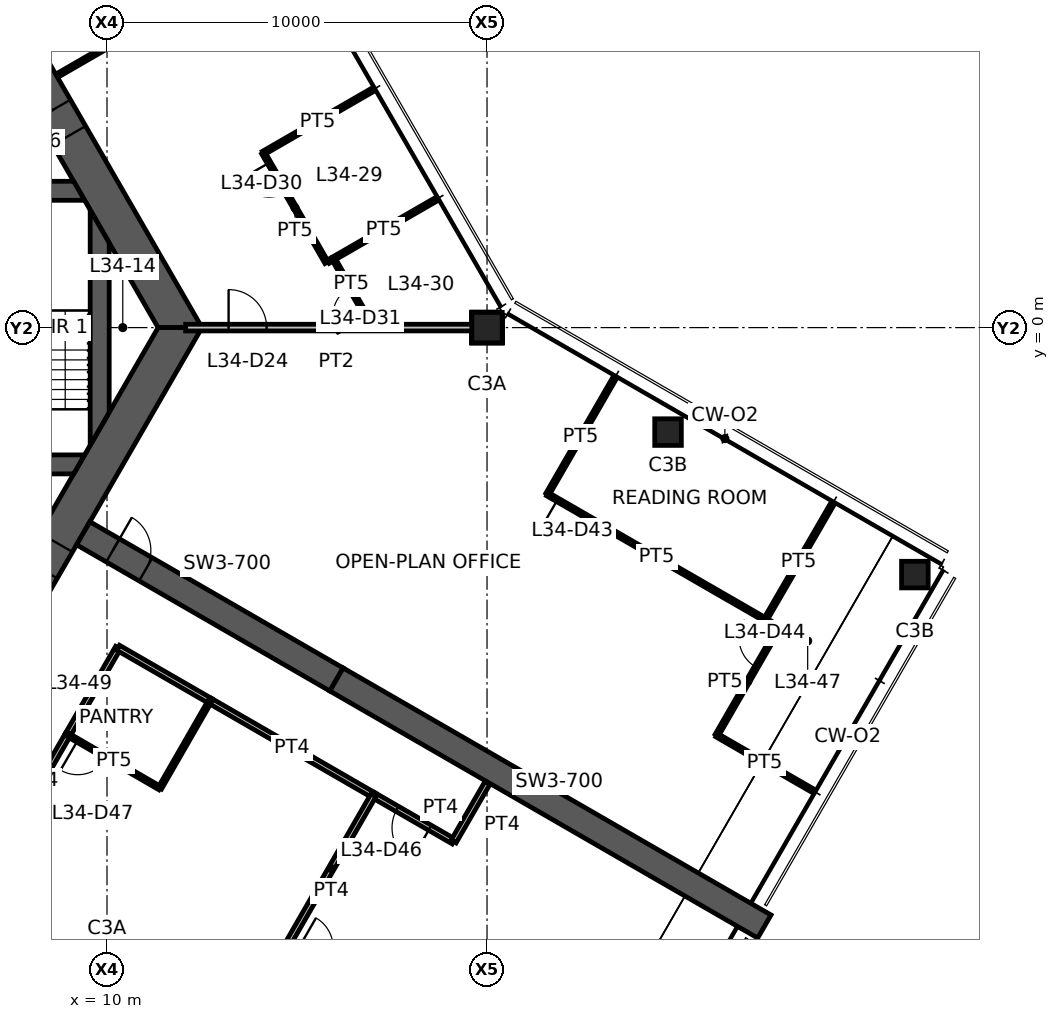
"""IFC4 building model, lengths in metres.
Left out: names, types, materials, properties, quantities, classifications, styles, units other than length and angle.
Written with IfcOpenShell. Run it as: python <this file> out.ifc"""

import sys

from ifc_helpers import new_model, si_unit, direction, frame, frame_2d, origin, origin_2d, place, context, subcontext, project, spatial, polyline, rectangle, hollow_rectangle, outline, extrude, element, fill, save


model = new_model("IFC4")
c1 = context("Model", 3, precision=1e-05, world=origin(), true_north=direction((0.0, 1.0)))
c2 = subcontext(c1, "Body", "Model", "MODEL_VIEW")
j1 = project(units=[si_unit("LENGTHUNIT", "METRE"), si_unit("PLANEANGLEUNIT", "RADIAN")], contexts=[c1])
p1 = place(None, origin())
s1 = spatial("IfcSite", under=j1, at=p1, CompositionType="ELEMENT")
p2 = place(p1, origin())
s2 = spatial("IfcBuilding", under=s1, at=p2, CompositionType="ELEMENT")
p3 = place(p2, frame((0.0, 0.0, 137.0)))
s3 = spatial("IfcBuildingStorey", under=s2, at=p3, CompositionType="ELEMENT", Elevation=137.0)
p4 = place(p3, frame((20.0, 0.0, 0.0), z_axis=(0.0, 0.0, 1.0), x_axis=(1.0, 0.0, 0.0)))
e1 = element("IfcColumn", 1, at=p4, inside=s3, PredefinedType="COLUMN", context=c2, shape_type="SweptSolid", body=[
    extrude(hollow_rectangle(XDim=0.8, YDim=0.8, WallThickness=0.045, at=origin_2d()), origin(), (0.0, 0.0, 1.0), 3.9),
])
for number, where, z_axis, x_axis in (
    (2, (24.763, -2.75, 0.0), (0.0, 0.0, 1.0), (1.0, 0.0, 0.0)),
    (3, (31.258, -6.5, 0.0), (0.0, 0.0, 1.0), (1.0, 0.0, 0.0)),
):
    element("IfcColumn", number, at=place(p3, frame(where, z_axis=z_axis, x_axis=x_axis)), inside=s3, PredefinedType="COLUMN", context=c2, shape_type="SweptSolid", body=[
        extrude(hollow_rectangle(XDim=0.7, YDim=0.7, WallThickness=0.036, at=origin_2d()), origin(), (0.0, 0.0, 1.0), 3.9),
    ])
p5 = place(p3, frame((11.922, 0.0, 0.0), z_axis=(0.0, 0.0, 1.0), x_axis=(-0.500004296715, 0.866022923061, 0.0)))
e4 = element("IfcWall", 4, at=p5, inside=s3, PredefinedType="SHEAR", context=c2, shape_type="SweptSolid", body=[
    extrude(outline(polyline([(-0.289, -0.5), (5.835, -0.5), (6.635, -0.5), (12.211, -0.5), (11.634, 0.5), (6.635, 0.5), (5.835, 0.5), (0.289, 0.5), (-0.289, -0.5)])), origin(), (0.0, 0.0, 1.0), 3.9),
])
p6 = place(p5, frame((5.835, 0.0, 0.0)))
e5 = element("IfcOpeningElement", 5, at=p6, cuts=e4, PredefinedType="OPENING", context=c2, shape_type="SweptSolid", body=[
    extrude(rectangle(XDim=0.8, YDim=2.1, at=frame_2d((0.4, 1.05))), frame((0.0, 0.51, 0.0), z_axis=(0.0, -1.0, 0.0), x_axis=(1.0, 0.0, 0.0)), (0.0, 0.0, 1.0), 1.02),
])
p7 = place(p3, frame((5.961, -10.325, 0.0), z_axis=(0.0, 0.0, 1.0), x_axis=(0.500004296715, 0.866022923061, 0.0)))
e6 = element("IfcWall", 6, at=p7, inside=s3, PredefinedType="SHEAR", context=c2, shape_type="SweptSolid", body=[
    extrude(outline(polyline([(-0.289, -0.5), (4.594, -0.5), (5.394, -0.5), (12.211, -0.5), (11.634, 0.5), (5.394, 0.5), (4.594, 0.5), (0.289, 0.5), (-0.289, -0.5)])), origin(), (0.0, 0.0, 1.0), 3.9),
])
p8 = place(p7, frame((4.594, 0.0, 0.0)))
e7 = element("IfcOpeningElement", 7, at=p8, cuts=e6, PredefinedType="OPENING", context=c2, shape_type="SweptSolid", body=[
    extrude(rectangle(XDim=0.8, YDim=2.1, at=frame_2d((0.4, 1.05))), frame((0.0, 0.51, 0.0), z_axis=(0.0, -1.0, 0.0), x_axis=(1.0, 0.0, 0.0)), (0.0, 0.0, 1.0), 1.02),
])
p9 = place(p3, frame((9.375, -5.413, 0.0), z_axis=(0.0, 0.0, 1.0), x_axis=(0.866032377459, -0.499987921047, 0.0)))
e8 = element("IfcWall", 8, at=p9, inside=s3, PredefinedType="SHEAR", context=c2, shape_type="SweptSolid", body=[
    extrude(rectangle(XDim=7.696, YDim=0.7, at=frame_2d((3.848, 0.0))), origin(), (0.0, 0.0, 1.0), 3.9),
])
p10 = place(p9, frame((0.9, 0.0, 0.0)))
e9 = element("IfcOpeningElement", 9, at=p10, cuts=e8, PredefinedType="OPENING", context=c2, shape_type="SweptSolid", body=[
    extrude(rectangle(XDim=1.0, YDim=2.1, at=frame_2d((0.5, 1.05))), frame((0.0, 0.36, 0.0), z_axis=(0.0, -1.0, 0.0), x_axis=(1.0, 0.0, 0.0)), (0.0, 0.0, 1.0), 0.72),
])
p11 = place(p3, frame((16.039, -9.26, 0.0), z_axis=(0.0, 0.0, 1.0), x_axis=(0.866024837091, -0.50000098154, 0.0)))
e10 = element("IfcWall", 10, at=p11, inside=s3, PredefinedType="SHEAR", context=c2, shape_type="SweptSolid", body=[
    extrude(rectangle(XDim=13.0, YDim=0.7, at=frame_2d((6.5, 0.0))), origin(), (0.0, 0.0, 1.0), 3.9),
])
p12 = place(p3, frame((1.35, 3.6, 0.0), z_axis=(0.0, 0.0, 1.0), x_axis=(1.0, 0.0, 0.0)))
e11 = element("IfcWall", 11, at=p12, inside=s3, PredefinedType="SHEAR", context=c2, shape_type="SweptSolid", body=[
    extrude(outline(polyline([(0.0, -0.25), (3.5, -0.25), (4.8, -0.25), (8.061, -0.25), (7.772, 0.25), (4.8, 0.25), (3.5, 0.25), (0.0, 0.25), (0.0, -0.25)])), origin(), (0.0, 0.0, 1.0), 3.9),
])
p13 = place(p12, frame((3.5, 0.0, 0.0)))
e12 = element("IfcOpeningElement", 12, at=p13, cuts=e11, PredefinedType="OPENING", context=c2, shape_type="SweptSolid", body=[
    extrude(rectangle(XDim=1.3, YDim=2.1, at=frame_2d((0.65, 1.05))), frame((0.0, 0.26, 0.0), z_axis=(0.0, -1.0, 0.0), x_axis=(1.0, 0.0, 0.0)), (0.0, 0.0, 1.0), 0.52),
])
p14 = place(p3, frame((1.35, -3.6, 0.0), z_axis=(0.0, 0.0, 1.0), x_axis=(1.0, 0.0, 0.0)))
e13 = element("IfcWall", 13, at=p14, inside=s3, PredefinedType="SHEAR", context=c2, shape_type="SweptSolid", body=[
    extrude(outline(polyline([(0.0, -0.25), (1.15, -0.25), (2.25, -0.25), (7.772, -0.25), (8.061, 0.25), (2.25, 0.25), (1.15, 0.25), (0.0, 0.25), (0.0, -0.25)])), origin(), (0.0, 0.0, 1.0), 3.9),
])
p15 = place(p14, frame((1.15, 0.0, 0.0)))
e14 = element("IfcOpeningElement", 14, at=p15, cuts=e13, PredefinedType="OPENING", context=c2, shape_type="SweptSolid", body=[
    extrude(rectangle(XDim=1.1, YDim=2.1, at=frame_2d((0.55, 1.05))), frame((0.0, 0.26, 0.0), z_axis=(0.0, -1.0, 0.0), x_axis=(1.0, 0.0, 0.0)), (0.0, 0.0, 1.0), 0.52),
])
p16 = place(p3, frame((9.808, -2.662, 0.0), z_axis=(0.0, 0.0, 1.0), x_axis=(0.0, 1.0, 0.0)))
e15 = element("IfcWall", 15, at=p16, inside=s3, PredefinedType="SHEAR", context=c2, shape_type="SweptSolid", body=[
    extrude(outline(polyline([(0.433, -0.25), (4.892, -0.25), (5.758, 0.25), (-0.433, 0.25), (0.433, -0.25)])), origin(), (0.0, 0.0, 1.0), 3.9),
])
p17 = place(p3, frame((12.07, 0.0, 0.0), z_axis=(0.0, 0.0, 1.0), x_axis=(1.0, 0.0, 0.0)))
e16 = element("IfcWall", 16, at=p17, inside=s3, PredefinedType="PARTITIONING", context=c2, shape_type="SweptSolid", body=[
    extrude(rectangle(XDim=7.93, YDim=0.175, at=frame_2d((3.965, 0.0))), origin(), (0.0, 0.0, 1.0), 3.05),
])
p18 = place(p17, frame((1.13, 0.0, 0.0)))
e17 = element("IfcOpeningElement", 17, at=p18, cuts=e16, PredefinedType="OPENING", context=c2, shape_type="SweptSolid", body=[
    extrude(rectangle(XDim=1.0, YDim=2.1, at=frame_2d((0.5, 1.05))), frame((0.0, 0.098, 0.0), z_axis=(0.0, -1.0, 0.0), x_axis=(1.0, 0.0, 0.0)), (0.0, 0.0, 1.0), 0.195),
])
p19 = place(p3, frame((11.1, 8.025, 0.0), z_axis=(0.0, 0.0, 1.0), x_axis=(-0.866056901187, -0.49994544093, 0.0)))
e18 = element("IfcWall", 18, at=p19, inside=s3, PredefinedType="PARTITIONING", context=c2, shape_type="SweptSolid", body=[
    extrude(rectangle(XDim=2.78, YDim=0.1, at=frame_2d((1.39, 0.0))), origin(), (0.0, 0.0, 1.0), 2.95),
])
p20 = place(p3, frame((18.62, 3.351, 0.0), z_axis=(0.0, 0.0, 1.0), x_axis=(-0.866043267704, -0.499969057507, 0.0)))
e19 = element("IfcWall", 19, at=p20, inside=s3, PredefinedType="PARTITIONING", context=c2, shape_type="SweptSolid", body=[
    extrude(rectangle(XDim=3.085, YDim=0.1, at=frame_2d((1.542, 0.0))), origin(), (0.0, 0.0, 1.0), 2.95),
])
p21 = place(p3, frame((14.114, 4.595, 0.0), z_axis=(0.0, 0.0, 1.0), x_axis=(0.866020751647, 0.500008057651, 0.0)))
e20 = element("IfcWall", 20, at=p21, inside=s3, PredefinedType="PARTITIONING", context=c2, shape_type="SweptSolid", body=[
    extrude(rectangle(XDim=3.305, YDim=0.1, at=frame_2d((1.653, 0.0))), origin(), (0.0, 0.0, 1.0), 2.95),
])
p22 = place(p3, frame((15.779, 1.71, 0.0), z_axis=(0.0, 0.0, 1.0), x_axis=(-0.500001606164, 0.866024476463, 0.0)))
e21 = element("IfcWall", 21, at=p22, inside=s3, PredefinedType="PARTITIONING", context=c2, shape_type="SweptSolid", body=[
    extrude(rectangle(XDim=3.331, YDim=0.1, at=frame_2d((1.666, 0.0))), origin(), (0.0, 0.0, 1.0), 2.95),
])
p23 = place(p22, frame((2.131, 0.0, 0.0)))
e22 = element("IfcOpeningElement", 22, at=p23, cuts=e21, PredefinedType="OPENING", context=c2, shape_type="SweptSolid", body=[
    extrude(rectangle(XDim=0.9, YDim=2.1, at=frame_2d((0.45, 1.05))), frame((0.0, 0.06, 0.0), z_axis=(0.0, -1.0, 0.0), x_axis=(1.0, 0.0, 0.0)), (0.0, 0.0, 1.0), 0.12),
])
p24 = place(p3, frame((16.986, 0.02, 0.0), z_axis=(0.0, 0.0, 1.0), x_axis=(-0.498096123952, 0.867121820337, 0.0)))
e23 = element("IfcWall", 23, at=p24, inside=s3, PredefinedType="PARTITIONING", context=c2, shape_type="SweptSolid", body=[
    extrude(rectangle(XDim=2.067, YDim=0.1, at=frame_2d((1.034, 0.0))), origin(), (0.0, 0.0, 1.0), 2.95),
])
p25 = place(p24, frame((0.3, 0.0, 0.0)))
e24 = element("IfcOpeningElement", 24, at=p25, cuts=e23, PredefinedType="OPENING", context=c2, shape_type="SweptSolid", body=[
    extrude(rectangle(XDim=0.9, YDim=2.1, at=frame_2d((0.45, 1.05))), frame((0.0, 0.06, 0.0), z_axis=(0.0, -1.0, 0.0), x_axis=(1.0, 0.0, 0.0)), (0.0, 0.0, 1.0), 0.12),
])
p26 = place(p3, frame((29.077, -4.658, 0.0), z_axis=(0.0, 0.0, 1.0), x_axis=(-0.501313567819, -0.865265685625, 0.0)))
e25 = element("IfcWall", 25, at=p26, inside=s3, PredefinedType="PARTITIONING", context=c2, shape_type="SweptSolid", body=[
    extrude(rectangle(XDim=3.505, YDim=0.1, at=frame_2d((1.752, 0.0))), origin(), (0.0, 0.0, 1.0), 2.95),
])
p27 = place(p3, frame((21.592, -4.383, 0.0), z_axis=(0.0, 0.0, 1.0), x_axis=(0.500009906705, 0.86601968407, 0.0)))
e26 = element("IfcWall", 26, at=p27, inside=s3, PredefinedType="PARTITIONING", context=c2, shape_type="SweptSolid", body=[
    extrude(rectangle(XDim=3.48, YDim=0.1, at=frame_2d((1.74, 0.0))), origin(), (0.0, 0.0, 1.0), 2.95),
])
p28 = place(p3, frame((27.327, -7.69, 0.0), z_axis=(0.0, 0.0, 1.0), x_axis=(-0.866318796728, 0.499491483847, 0.0)))
e27 = element("IfcWall", 27, at=p28, inside=s3, PredefinedType="PARTITIONING", context=c2, shape_type="SweptSolid", body=[
    extrude(rectangle(XDim=6.62, YDim=0.1, at=frame_2d((3.31, 0.0))), origin(), (0.0, 0.0, 1.0), 2.95),
])
p29 = place(p28, frame((5.42, 0.0, 0.0)))
e28 = element("IfcOpeningElement", 28, at=p29, cuts=e27, PredefinedType="OPENING", context=c2, shape_type="SweptSolid", body=[
    extrude(rectangle(XDim=0.9, YDim=2.1, at=frame_2d((0.45, 1.05))), frame((0.0, 0.06, 0.0), z_axis=(0.0, -1.0, 0.0), x_axis=(1.0, 0.0, 0.0)), (0.0, 0.0, 1.0), 0.12),
])
p30 = place(p3, frame((26.046, -10.727, 0.0), z_axis=(0.0, 0.0, 1.0), x_axis=(0.499765599164, 0.866160692881, 0.0)))
e29 = element("IfcWall", 29, at=p30, inside=s3, PredefinedType="PARTITIONING", context=c2, shape_type="SweptSolid", body=[
    extrude(rectangle(XDim=3.266, YDim=0.1, at=frame_2d((1.633, 0.0))), origin(), (0.0, 0.0, 1.0), 2.95),
])
p31 = place(p30, frame((2.066, 0.0, 0.0)))
e30 = element("IfcOpeningElement", 30, at=p31, cuts=e29, PredefinedType="OPENING", context=c2, shape_type="SweptSolid", body=[
    extrude(rectangle(XDim=0.9, YDim=2.1, at=frame_2d((0.45, 1.05))), frame((0.0, 0.06, 0.0), z_axis=(0.0, -1.0, 0.0), x_axis=(1.0, 0.0, 0.0)), (0.0, 0.0, 1.0), 0.12),
])
p32 = place(p3, frame((27.678, -7.898, 0.0), z_axis=(0.0, 0.0, 1.0), x_axis=(-0.859748322004, 0.510717948394, 0.0)))
e31 = element("IfcWall", 31, at=p32, inside=s3, PredefinedType="PARTITIONING", context=c2, shape_type="SweptSolid", body=[
    extrude(rectangle(XDim=0.409, YDim=0.1, at=frame_2d((0.205, 0.0))), origin(), (0.0, 0.0, 1.0), 2.95),
])
p33 = place(p3, frame((28.562, -12.18, 0.0), z_axis=(0.0, 0.0, 1.0), x_axis=(-0.866031657677, 0.499989167784, 0.0)))
e32 = element("IfcWall", 32, at=p33, inside=s3, PredefinedType="PARTITIONING", context=c2, shape_type="SweptSolid", body=[
    extrude(rectangle(XDim=2.905, YDim=0.1, at=frame_2d((1.453, 0.0))), origin(), (0.0, 0.0, 1.0), 2.95),
])
p34 = place(p3, frame((10.292, -8.425, 0.0), z_axis=(0.0, 0.0, 1.0), x_axis=(-0.499966561876, -0.866044708433, 0.0)))
e33 = element("IfcWall", 33, at=p34, inside=s3, PredefinedType="PARTITIONING", context=c2, shape_type="SweptSolid", body=[
    extrude(rectangle(XDim=2.655, YDim=0.15, at=frame_2d((1.328, 0.0))), origin(), (0.0, 0.0, 1.0), 2.95),
])
p35 = place(p3, frame((12.721, -9.827, 0.0), z_axis=(0.0, 0.0, 1.0), x_axis=(-0.866049342339, 0.499958534914, 0.0)))
e34 = element("IfcWall", 34, at=p35, inside=s3, PredefinedType="PARTITIONING", context=c2, shape_type="SweptSolid", body=[
    extrude(rectangle(XDim=2.805, YDim=0.15, at=frame_2d((1.402, 0.0))), origin(), (0.0, 0.0, 1.0), 2.95),
])
p36 = place(p3, frame((8.969, -10.716, 0.0), z_axis=(0.0, 0.0, 1.0), x_axis=(-0.500008568482, -0.866020456713, 0.0)))
e35 = element("IfcWall", 35, at=p36, inside=s3, PredefinedType="PARTITIONING", context=c2, shape_type="SweptSolid", body=[
    extrude(rectangle(XDim=2.782, YDim=0.15, at=frame_2d((1.391, 0.0))), origin(), (0.0, 0.0, 1.0), 2.95),
])
p37 = place(p3, frame((17.021, -12.31, 0.0), z_axis=(0.0, 0.0, 1.0), x_axis=(-0.866018071205, 0.500012700186, 0.0)))
e36 = element("IfcWall", 36, at=p37, inside=s3, PredefinedType="PARTITIONING", context=c2, shape_type="SweptSolid", body=[
    extrude(rectangle(XDim=4.975, YDim=0.15, at=frame_2d((2.488, 0.0))), origin(), (0.0, 0.0, 1.0), 2.95),
])
p38 = place(p3, frame((19.121, -13.522, 0.0), z_axis=(0.0, 0.0, 1.0), x_axis=(-0.866000196749, 0.500043657324, 0.0)))
e37 = element("IfcWall", 37, at=p38, inside=s3, PredefinedType="PARTITIONING", context=c2, shape_type="SweptSolid", body=[
    extrude(rectangle(XDim=2.434, YDim=0.15, at=frame_2d((1.217, 0.0))), origin(), (0.0, 0.0, 1.0), 2.95),
])
p39 = place(p38, frame((0.717, 0.0, 0.0)))
e38 = element("IfcOpeningElement", 38, at=p39, cuts=e37, PredefinedType="OPENING", context=c2, shape_type="SweptSolid", body=[
    extrude(rectangle(XDim=1.0, YDim=2.1, at=frame_2d((0.5, 1.05))), frame((0.0, 0.085, 0.0), z_axis=(0.0, -1.0, 0.0), x_axis=(1.0, 0.0, 0.0)), (0.0, 0.0, 1.0), 0.17),
])
p40 = place(p3, frame((20.011, -11.981, 0.0), z_axis=(0.0, 0.0, 1.0), x_axis=(-0.500062787734, -0.865989150234, 0.0)))
e39 = element("IfcWall", 39, at=p40, inside=s3, PredefinedType="PARTITIONING", context=c2, shape_type="SweptSolid", body=[
    extrude(rectangle(XDim=1.78, YDim=0.15, at=frame_2d((0.89, 0.0))), origin(), (0.0, 0.0, 1.0), 2.95),
])
p41 = place(p3, frame((11.392, -12.119, 0.0), z_axis=(0.0, 0.0, 1.0), x_axis=(-0.865255114713, 0.501331812737, 0.0)))
e40 = element("IfcWall", 40, at=p41, inside=s3, PredefinedType="PARTITIONING", context=c2, shape_type="SweptSolid", body=[
    extrude(rectangle(XDim=2.8, YDim=0.1, at=frame_2d((1.4, 0.0))), origin(), (0.0, 0.0, 1.0), 2.95),
])
p42 = place(p41, frame((1.6, 0.0, 0.0)))
e41 = element("IfcOpeningElement", 41, at=p42, cuts=e40, PredefinedType="OPENING", context=c2, shape_type="SweptSolid", body=[
    extrude(rectangle(XDim=0.9, YDim=2.1, at=frame_2d((0.45, 1.05))), frame((0.0, 0.06, 0.0), z_axis=(0.0, -1.0, 0.0), x_axis=(1.0, 0.0, 0.0)), (0.0, 0.0, 1.0), 0.12),
])
p43 = place(p3, frame((12.713, -9.822, 0.0), z_axis=(0.0, 0.0, 1.0), x_axis=(-0.49852824611, -0.866873455488, 0.0)))
e42 = element("IfcWall", 42, at=p43, inside=s3, PredefinedType="PARTITIONING", context=c2, shape_type="SweptSolid", body=[
    extrude(rectangle(XDim=2.65, YDim=0.1, at=frame_2d((1.325, 0.0))), origin(), (0.0, 0.0, 1.0), 2.95),
])
p44 = place(p3, frame((17.013, -12.305, 0.0), z_axis=(0.0, 0.0, 1.0), x_axis=(-0.499081704511, -0.866554933182, 0.0)))
e43 = element("IfcWall", 43, at=p44, inside=s3, PredefinedType="PARTITIONING", context=c2, shape_type="SweptSolid", body=[
    extrude(rectangle(XDim=4.454, YDim=0.15, at=frame_2d((2.227, 0.0))), origin(), (0.0, 0.0, 1.0), 2.95),
])
p45 = place(p3, frame((15.823, 1.735, 0.0), z_axis=(0.0, 0.0, 1.0), x_axis=(0.867234405398, 0.497900076415, 0.0)))
e44 = element("IfcWall", 44, at=p45, inside=s3, PredefinedType="PARTITIONING", context=c2, shape_type="SweptSolid", body=[
    extrude(rectangle(XDim=0.104, YDim=0.1, at=frame_2d((0.052, 0.0))), origin(), (0.0, 0.0, 1.0), 2.95),
])
p46 = place(p6, origin())
e45 = element("IfcDoor", 45, at=p46, inside=s3, OperationType="SINGLE_SWING_RIGHT", PredefinedType="DOOR", context=c2, shape_type="SweptSolid", body=[
    extrude(rectangle(XDim=0.8, YDim=2.1, at=frame_2d((0.4, 1.05))), frame((0.0, 0.025, 0.0), z_axis=(0.0, -1.0, 0.0), x_axis=(1.0, 0.0, 0.0)), (0.0, 0.0, 1.0), 0.05),
])
fill(e5, e45)
p47 = place(p8, origin())
e46 = element("IfcDoor", 46, at=p47, inside=s3, OperationType="SINGLE_SWING_LEFT", PredefinedType="DOOR", context=c2, shape_type="SweptSolid", body=[
    extrude(rectangle(XDim=0.8, YDim=2.1, at=frame_2d((0.4, 1.05))), frame((0.0, 0.025, 0.0), z_axis=(0.0, -1.0, 0.0), x_axis=(1.0, 0.0, 0.0)), (0.0, 0.0, 1.0), 0.05),
])
fill(e7, e46)
p48 = place(p10, origin())
e47 = element("IfcDoor", 47, at=p48, inside=s3, OperationType="SINGLE_SWING_LEFT", PredefinedType="DOOR", context=c2, shape_type="SweptSolid", body=[
    extrude(rectangle(XDim=1.0, YDim=2.1, at=frame_2d((0.5, 1.05))), frame((0.0, 0.025, 0.0), z_axis=(0.0, -1.0, 0.0), x_axis=(1.0, 0.0, 0.0)), (0.0, 0.0, 1.0), 0.05),
])
fill(e9, e47)
p49 = place(p18, origin())
e48 = element("IfcDoor", 48, at=p49, inside=s3, OperationType="SINGLE_SWING_LEFT", PredefinedType="DOOR", context=c2, shape_type="SweptSolid", body=[
    extrude(rectangle(XDim=1.0, YDim=2.1, at=frame_2d((0.5, 1.05))), frame((0.0, 0.025, 0.0), z_axis=(0.0, -1.0, 0.0), x_axis=(1.0, 0.0, 0.0)), (0.0, 0.0, 1.0), 0.05),
])
fill(e17, e48)
p50 = place(p23, origin())
e49 = element("IfcDoor", 49, at=p50, inside=s3, OperationType="SINGLE_SWING_RIGHT", PredefinedType="DOOR", context=c2, shape_type="SweptSolid", body=[
    extrude(rectangle(XDim=0.9, YDim=2.1, at=frame_2d((0.45, 1.05))), frame((0.0, 0.025, 0.0), z_axis=(0.0, -1.0, 0.0), x_axis=(1.0, 0.0, 0.0)), (0.0, 0.0, 1.0), 0.05),
])
fill(e22, e49)
p51 = place(p25, origin())
e50 = element("IfcDoor", 50, at=p51, inside=s3, OperationType="SINGLE_SWING_LEFT", PredefinedType="DOOR", context=c2, shape_type="SweptSolid", body=[
    extrude(rectangle(XDim=0.9, YDim=2.1, at=frame_2d((0.45, 1.05))), frame((0.0, 0.025, 0.0), z_axis=(0.0, -1.0, 0.0), x_axis=(1.0, 0.0, 0.0)), (0.0, 0.0, 1.0), 0.05),
])
fill(e24, e50)
p52 = place(p29, origin())
e51 = element("IfcDoor", 51, at=p52, inside=s3, OperationType="SINGLE_SWING_RIGHT", PredefinedType="DOOR", context=c2, shape_type="SweptSolid", body=[
    extrude(rectangle(XDim=0.9, YDim=2.1, at=frame_2d((0.45, 1.05))), frame((0.0, 0.025, 0.0), z_axis=(0.0, -1.0, 0.0), x_axis=(1.0, 0.0, 0.0)), (0.0, 0.0, 1.0), 0.05),
])
fill(e28, e51)
p53 = place(p31, origin())
e52 = element("IfcDoor", 52, at=p53, inside=s3, OperationType="SINGLE_SWING_RIGHT", PredefinedType="DOOR", context=c2, shape_type="SweptSolid", body=[
    extrude(rectangle(XDim=0.9, YDim=2.1, at=frame_2d((0.45, 1.05))), frame((0.0, 0.025, 0.0), z_axis=(0.0, -1.0, 0.0), x_axis=(1.0, 0.0, 0.0)), (0.0, 0.0, 1.0), 0.05),
])
fill(e30, e52)
p54 = place(p39, origin())
e53 = element("IfcDoor", 53, at=p54, inside=s3, OperationType="SINGLE_SWING_LEFT", PredefinedType="DOOR", context=c2, shape_type="SweptSolid", body=[
    extrude(rectangle(XDim=1.0, YDim=2.1, at=frame_2d((0.5, 1.05))), frame((0.0, 0.025, 0.0), z_axis=(0.0, -1.0, 0.0), x_axis=(1.0, 0.0, 0.0)), (0.0, 0.0, 1.0), 0.05),
])
fill(e38, e53)
p55 = place(p42, origin())
e54 = element("IfcDoor", 54, at=p55, inside=s3, OperationType="SINGLE_SWING_RIGHT", PredefinedType="DOOR", context=c2, shape_type="SweptSolid", body=[
    extrude(rectangle(XDim=0.9, YDim=2.1, at=frame_2d((0.45, 1.05))), frame((0.0, 0.025, 0.0), z_axis=(0.0, -1.0, 0.0), x_axis=(1.0, 0.0, 0.0)), (0.0, 0.0, 1.0), 0.05),
])
fill(e41, e54)
save(model, sys.argv[1])
